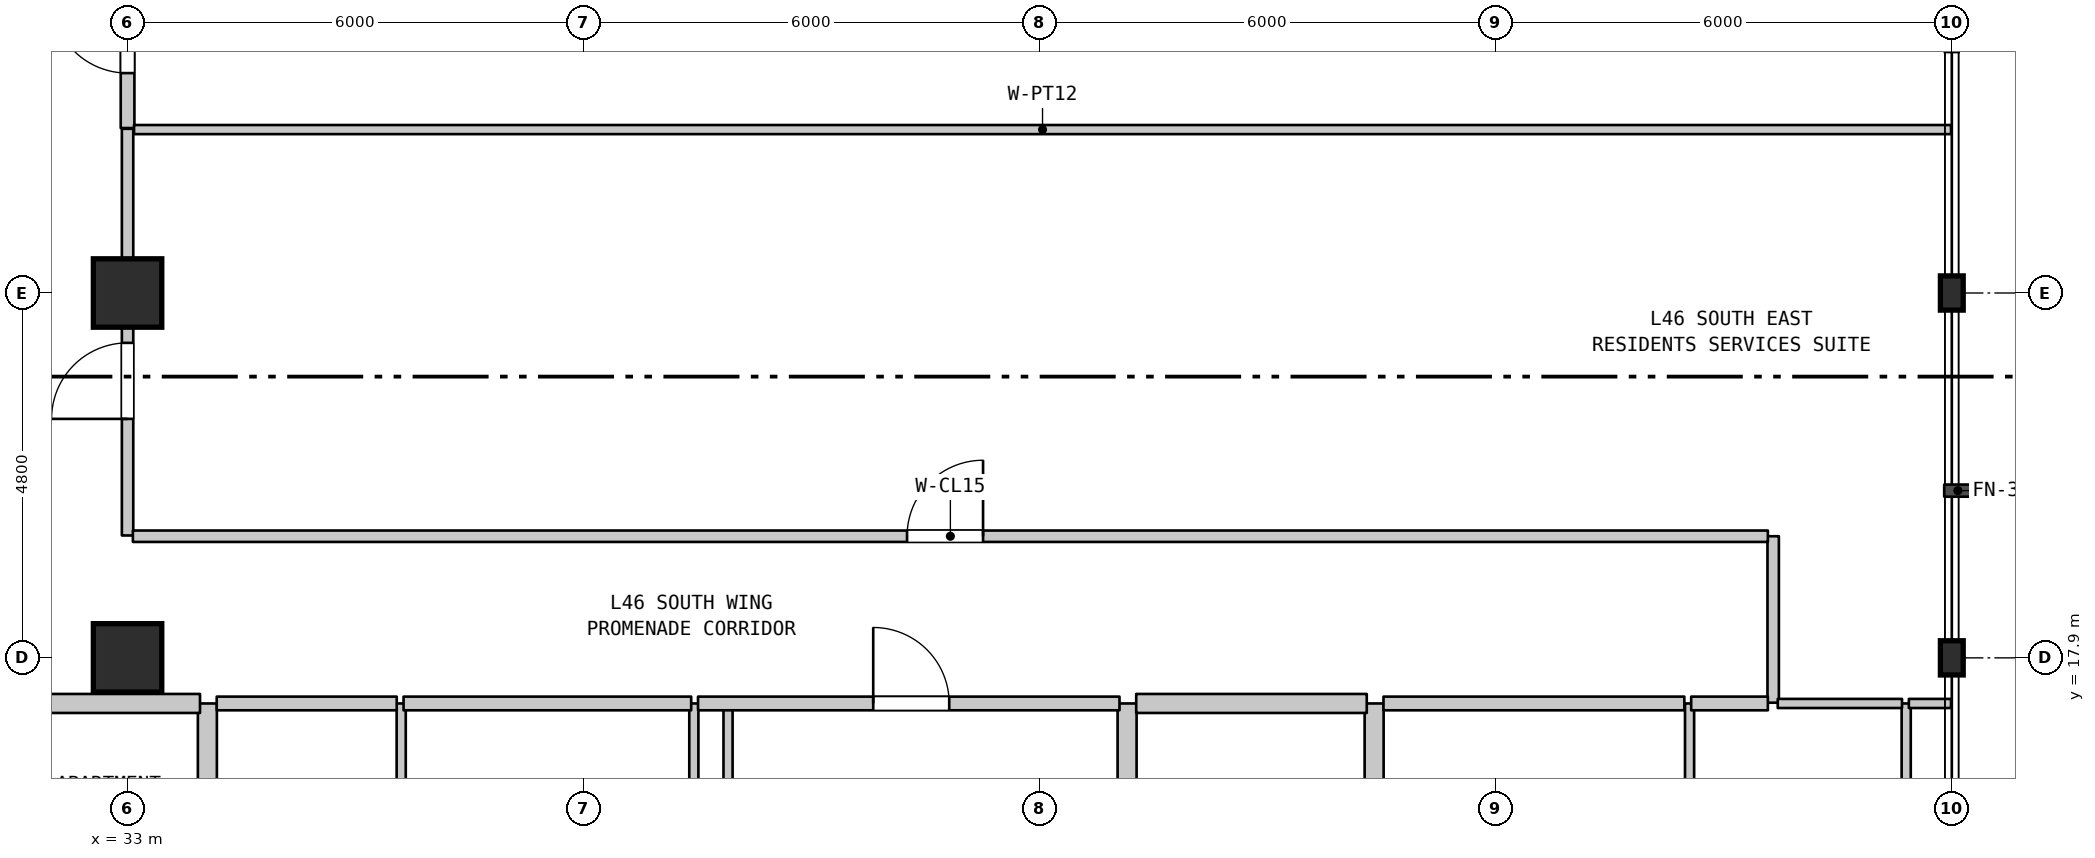
"""IFC4 building model, lengths in metres.
Left out: names, types, materials, properties, quantities, classifications, styles, units other than length and angle.
Written with IfcOpenShell. Run it as: python <this file> out.ifc"""

import sys

from ifc_helpers import new_model, si_unit, direction, frame, frame_2d, origin, origin_2d, place, context, subcontext, project, spatial, rectangle, i_section, extrude, element, fill, save


model = new_model("IFC4")
c1 = context("Model", 3, precision=1e-05, world=origin(), true_north=direction((0.0, 1.0)))
c2 = subcontext(c1, "Body", "Model", "MODEL_VIEW")
j1 = project(units=[si_unit("LENGTHUNIT", "METRE"), si_unit("PLANEANGLEUNIT", "RADIAN")], contexts=[c1])
p1 = place(None, origin())
s1 = spatial("IfcSite", under=j1, at=p1, CompositionType="ELEMENT")
p2 = place(p1, origin())
s2 = spatial("IfcBuilding", under=s1, at=p2, CompositionType="ELEMENT")
p3 = place(p2, frame((0.0, 0.0, 188.4)))
s3 = spatial("IfcBuildingStorey", under=s2, at=p3, CompositionType="ELEMENT", Elevation=188.4)
for number, where, z_axis, x_axis in (
    (1, (33.0, 17.9, 0.0), (0.0, 0.0, 1.0), (1.0, 0.0, 0.0)),
    (2, (33.0, 22.7, 0.0), (0.0, 0.0, 1.0), (1.0, 0.0, 0.0)),
):
    element("IfcColumn", number, at=place(p3, frame(where, z_axis=z_axis, x_axis=x_axis)), inside=s3, PredefinedType="COLUMN", context=c2, shape_type="SweptSolid", body=[
        extrude(rectangle(XDim=0.9, YDim=0.9, at=origin_2d()), origin(), (0.0, 0.0, 1.0), 3.7),
    ])
for number, where, z_axis, x_axis in (
    (3, (57.0, 17.9, 0.0), (0.0, 0.0, 1.0), (1.0, 0.0, 0.0)),
    (4, (57.0, 22.7, 0.0), (0.0, 0.0, 1.0), (1.0, 0.0, 0.0)),
):
    element("IfcColumn", number, at=place(p3, frame(where, z_axis=z_axis, x_axis=x_axis)), inside=s3, PredefinedType="COLUMN", context=c2, shape_type="SweptSolid", body=[
        extrude(i_section(OverallWidth=0.3, OverallDepth=0.45, WebThickness=0.014, FlangeThickness=0.026, FilletRadius=0.027, at=origin_2d()), origin(), (0.0, 0.0, 1.0), 3.7),
    ])
p4 = place(p3, frame((33.0, 19.51, 0.0), z_axis=(0.0, 0.0, 1.0), x_axis=(0.0, 1.0, 0.0)))
e5 = element("IfcWall", 5, at=p4, inside=s3, PredefinedType="STANDARD", context=c2, shape_type="SweptSolid", body=[
    extrude(rectangle(XDim=5.35, YDim=0.15, at=frame_2d((2.675, 0.0))), origin(), (0.0, 0.0, 1.0), 2.99),
])
p5 = place(p4, frame((1.534, 0.0, 0.0)))
e6 = element("IfcOpeningElement", 6, at=p5, cuts=e5, PredefinedType="OPENING", context=c2, shape_type="SweptSolid", body=[
    extrude(rectangle(XDim=1.0, YDim=2.15, at=frame_2d((0.5, 1.075))), frame((0.0, 0.085, 0.0), z_axis=(0.0, -1.0, 0.0), x_axis=(1.0, 0.0, 0.0)), (0.0, 0.0, 1.0), 0.17),
])
p6 = place(p3, frame((33.0, 24.87, 0.0), z_axis=(0.0, 0.0, 1.0), x_axis=(0.0, 1.0, 0.0)))
e7 = element("IfcWall", 7, at=p6, inside=s3, PredefinedType="STANDARD", context=c2, shape_type="SweptSolid", body=[
    extrude(rectangle(XDim=2.6, YDim=0.18, at=frame_2d((1.3, 0.0))), origin(), (0.0, 0.0, 1.0), 2.99),
])
p7 = place(p6, frame((0.723, 0.0, 0.0)))
e8 = element("IfcOpeningElement", 8, at=p7, cuts=e7, PredefinedType="OPENING", context=c2, shape_type="SweptSolid", body=[
    extrude(rectangle(XDim=1.0, YDim=2.15, at=frame_2d((0.5, 1.075))), frame((0.0, 0.1, 0.0), z_axis=(0.0, -1.0, 0.0), x_axis=(1.0, 0.0, 0.0)), (0.0, 0.0, 1.0), 0.2),
])
p8 = place(p3, frame((34.05, 11.15, 0.0), z_axis=(0.0, 0.0, 1.0), x_axis=(0.0, 1.0, 0.0)))
e9 = element("IfcWall", 9, at=p8, inside=s3, PredefinedType="STANDARD", context=c2, shape_type="SweptSolid", body=[
    extrude(rectangle(XDim=6.15, YDim=0.25, at=frame_2d((3.075, 0.0))), origin(), (0.0, 0.0, 1.0), 3.39),
])
for number, where, z_axis, x_axis in (
    (10, (36.6, 11.15, 0.0), (0.0, 0.0, 1.0), (0.0, 1.0, 0.0)),
    (11, (40.45, 11.15, 0.0), (0.0, 0.0, 1.0), (0.0, 1.0, 0.0)),
):
    element("IfcWall", number, at=place(p3, frame(where, z_axis=z_axis, x_axis=x_axis)), inside=s3, PredefinedType="PARTITIONING", context=c2, shape_type="SweptSolid", body=[
        extrude(rectangle(XDim=6.15, YDim=0.12, at=frame_2d((3.075, 0.0))), origin(), (0.0, 0.0, 1.0), 3.39),
    ])
p9 = place(p3, frame((40.9, 14.85, 0.0), z_axis=(0.0, 0.0, 1.0), x_axis=(0.0, 1.0, 0.0)))
e12 = element("IfcWall", 12, at=p9, inside=s3, PredefinedType="PARTITIONING", context=c2, shape_type="SweptSolid", body=[
    extrude(rectangle(XDim=2.45, YDim=0.12, at=frame_2d((1.225, 0.0))), origin(), (0.0, 0.0, 1.0), 3.39),
])
for number, where, z_axis, x_axis in (
    (13, (46.15, 11.15, 0.0), (0.0, 0.0, 1.0), (0.0, 1.0, 0.0)),
    (14, (49.4, 11.15, 0.0), (0.0, 0.0, 1.0), (0.0, 1.0, 0.0)),
):
    element("IfcWall", number, at=place(p3, frame(where, z_axis=z_axis, x_axis=x_axis)), inside=s3, PredefinedType="STANDARD", context=c2, shape_type="SweptSolid", body=[
        extrude(rectangle(XDim=6.15, YDim=0.25, at=frame_2d((3.075, 0.0))), origin(), (0.0, 0.0, 1.0), 3.39),
    ])
p10 = place(p3, frame((53.55, 11.15, 0.0), z_axis=(0.0, 0.0, 1.0), x_axis=(0.0, 1.0, 0.0)))
e15 = element("IfcWall", 15, at=p10, inside=s3, PredefinedType="PARTITIONING", context=c2, shape_type="SweptSolid", body=[
    extrude(rectangle(XDim=6.15, YDim=0.12, at=frame_2d((3.075, 0.0))), origin(), (0.0, 0.0, 1.0), 3.39),
])
p11 = place(p3, frame((54.65, 17.31, 0.0), z_axis=(0.0, 0.0, 1.0), x_axis=(0.0, 1.0, 0.0)))
e16 = element("IfcWall", 16, at=p11, inside=s3, PredefinedType="STANDARD", context=c2, shape_type="SweptSolid", body=[
    extrude(rectangle(XDim=2.19, YDim=0.15, at=frame_2d((1.095, 0.0))), origin(), (0.0, 0.0, 1.0), 3.39),
])
p12 = place(p3, frame((56.4, 11.15, 0.0), z_axis=(0.0, 0.0, 1.0), x_axis=(0.0, 1.0, 0.0)))
e17 = element("IfcWall", 17, at=p12, inside=s3, PredefinedType="PARTITIONING", context=c2, shape_type="SweptSolid", body=[
    extrude(rectangle(XDim=6.15, YDim=0.12, at=frame_2d((3.075, 0.0))), origin(), (0.0, 0.0, 1.0), 3.39),
])
p13 = place(p3, frame((31.56, 17.3, 0.0), z_axis=(0.0, 0.0, 1.0), x_axis=(1.0, 0.0, 0.0)))
e18 = element("IfcWall", 18, at=p13, inside=s3, PredefinedType="STANDARD", context=c2, shape_type="SweptSolid", body=[
    extrude(rectangle(XDim=2.393, YDim=0.25, at=frame_2d((1.196, 0.0))), origin(), (0.0, 0.0, 1.0), 3.39),
])
p14 = place(p3, frame((34.173, 17.3, 0.0), z_axis=(0.0, 0.0, 1.0), x_axis=(1.0, 0.0, 0.0)))
e19 = element("IfcWall", 19, at=p14, inside=s3, PredefinedType="STANDARD", context=c2, shape_type="SweptSolid", body=[
    extrude(rectangle(XDim=2.368, YDim=0.18, at=frame_2d((1.184, 0.0))), origin(), (0.0, 0.0, 1.0), 3.39),
])
p15 = place(p3, frame((36.631, 17.3, 0.0), z_axis=(0.0, 0.0, 1.0), x_axis=(1.0, 0.0, 0.0)))
e20 = element("IfcWall", 20, at=p15, inside=s3, PredefinedType="STANDARD", context=c2, shape_type="SweptSolid", body=[
    extrude(rectangle(XDim=3.784, YDim=0.18, at=frame_2d((1.892, 0.0))), origin(), (0.0, 0.0, 1.0), 3.39),
])
p16 = place(p3, frame((40.505, 17.3, 0.0), z_axis=(0.0, 0.0, 1.0), x_axis=(1.0, 0.0, 0.0)))
e21 = element("IfcWall", 21, at=p16, inside=s3, PredefinedType="STANDARD", context=c2, shape_type="SweptSolid", body=[
    extrude(rectangle(XDim=5.545, YDim=0.18, at=frame_2d((2.772, 0.0))), origin(), (0.0, 0.0, 1.0), 3.39),
])
p17 = place(p16, frame((2.305, 0.0, 0.0)))
e22 = element("IfcOpeningElement", 22, at=p17, cuts=e21, PredefinedType="OPENING", context=c2, shape_type="SweptSolid", body=[
    extrude(rectangle(XDim=1.0, YDim=2.15, at=frame_2d((0.5, 1.075))), frame((0.0, 0.1, 0.0), z_axis=(0.0, -1.0, 0.0), x_axis=(1.0, 0.0, 0.0)), (0.0, 0.0, 1.0), 0.2),
])
p18 = place(p3, frame((46.27, 17.3, 0.0), z_axis=(0.0, 0.0, 1.0), x_axis=(1.0, 0.0, 0.0)))
e23 = element("IfcWall", 23, at=p18, inside=s3, PredefinedType="STANDARD", context=c2, shape_type="SweptSolid", body=[
    extrude(rectangle(XDim=3.033, YDim=0.25, at=frame_2d((1.517, 0.0))), origin(), (0.0, 0.0, 1.0), 3.39),
])
p19 = place(p3, frame((49.523, 17.3, 0.0), z_axis=(0.0, 0.0, 1.0), x_axis=(1.0, 0.0, 0.0)))
e24 = element("IfcWall", 24, at=p19, inside=s3, PredefinedType="STANDARD", context=c2, shape_type="SweptSolid", body=[
    extrude(rectangle(XDim=3.958, YDim=0.18, at=frame_2d((1.979, 0.0))), origin(), (0.0, 0.0, 1.0), 3.39),
])
p20 = place(p3, frame((53.571, 17.3, 0.0), z_axis=(0.0, 0.0, 1.0), x_axis=(1.0, 0.0, 0.0)))
e25 = element("IfcWall", 25, at=p20, inside=s3, PredefinedType="STANDARD", context=c2, shape_type="SweptSolid", body=[
    extrude(rectangle(XDim=1.009, YDim=0.18, at=frame_2d((0.504, 0.0))), origin(), (0.0, 0.0, 1.0), 3.39),
])
p21 = place(p3, frame((54.71, 17.3, 0.0), z_axis=(0.0, 0.0, 1.0), x_axis=(1.0, 0.0, 0.0)))
e26 = element("IfcWall", 26, at=p21, inside=s3, PredefinedType="PARTITIONING", context=c2, shape_type="SweptSolid", body=[
    extrude(rectangle(XDim=1.635, YDim=0.12, at=frame_2d((0.817, 0.0))), origin(), (0.0, 0.0, 1.0), 3.39),
])
p22 = place(p3, frame((56.435, 17.3, 0.0), z_axis=(0.0, 0.0, 1.0), x_axis=(1.0, 0.0, 0.0)))
e27 = element("IfcWall", 27, at=p22, inside=s3, PredefinedType="PARTITIONING", context=c2, shape_type="SweptSolid", body=[
    extrude(rectangle(XDim=0.555, YDim=0.12, at=frame_2d((0.277, 0.0))), origin(), (0.0, 0.0, 1.0), 3.39),
])
p23 = place(p3, frame((33.07, 19.5, 0.0), z_axis=(0.0, 0.0, 1.0), x_axis=(1.0, 0.0, 0.0)))
e28 = element("IfcWall", 28, at=p23, inside=s3, PredefinedType="STANDARD", context=c2, shape_type="SweptSolid", body=[
    extrude(rectangle(XDim=21.51, YDim=0.15, at=frame_2d((10.755, 0.0))), origin(), (0.0, 0.0, 1.0), 3.39),
])
p24 = place(p23, frame((10.185, 0.0, 0.0)))
e29 = element("IfcOpeningElement", 29, at=p24, cuts=e28, PredefinedType="OPENING", context=c2, shape_type="SweptSolid", body=[
    extrude(rectangle(XDim=1.0, YDim=2.15, at=frame_2d((0.5, 1.075))), frame((0.0, 0.085, 0.0), z_axis=(0.0, -1.0, 0.0), x_axis=(1.0, 0.0, 0.0)), (0.0, 0.0, 1.0), 0.17),
])
p25 = place(p3, frame((33.085, 24.85, 0.0), z_axis=(0.0, 0.0, 1.0), x_axis=(1.0, 0.0, 0.0)))
e30 = element("IfcWall", 30, at=p25, inside=s3, PredefinedType="PARTITIONING", context=c2, shape_type="SweptSolid", body=[
    extrude(rectangle(XDim=23.905, YDim=0.12, at=frame_2d((11.953, 0.0))), origin(), (0.0, 0.0, 1.0), 3.39),
])
p26 = place(p5, origin())
e31 = element("IfcDoor", 31, at=p26, inside=s3, OperationType="SINGLE_SWING_LEFT", PredefinedType="DOOR", context=c2, shape_type="SweptSolid", body=[
    extrude(rectangle(XDim=1.0, YDim=2.15, at=frame_2d((0.5, 1.075))), frame((0.0, 0.025, 0.0), z_axis=(0.0, -1.0, 0.0), x_axis=(1.0, 0.0, 0.0)), (0.0, 0.0, 1.0), 0.05),
])
fill(e6, e31)
p27 = place(p7, origin())
e32 = element("IfcDoor", 32, at=p27, inside=s3, OperationType="SINGLE_SWING_RIGHT", PredefinedType="DOOR", context=c2, shape_type="SweptSolid", body=[
    extrude(rectangle(XDim=1.0, YDim=2.15, at=frame_2d((0.5, 1.075))), frame((0.0, 0.025, 0.0), z_axis=(0.0, -1.0, 0.0), x_axis=(1.0, 0.0, 0.0)), (0.0, 0.0, 1.0), 0.05),
])
fill(e8, e32)
p28 = place(p17, origin())
e33 = element("IfcDoor", 33, at=p28, inside=s3, OperationType="SINGLE_SWING_LEFT", PredefinedType="DOOR", context=c2, shape_type="SweptSolid", body=[
    extrude(rectangle(XDim=1.0, YDim=2.15, at=frame_2d((0.5, 1.075))), frame((0.0, 0.025, 0.0), z_axis=(0.0, -1.0, 0.0), x_axis=(1.0, 0.0, 0.0)), (0.0, 0.0, 1.0), 0.05),
])
fill(e22, e33)
p29 = place(p24, origin())
e34 = element("IfcDoor", 34, at=p29, inside=s3, OperationType="SINGLE_SWING_RIGHT", PredefinedType="DOOR", context=c2, shape_type="SweptSolid", body=[
    extrude(rectangle(XDim=1.0, YDim=2.15, at=frame_2d((0.5, 1.075))), frame((0.0, 0.025, 0.0), z_axis=(0.0, -1.0, 0.0), x_axis=(1.0, 0.0, 0.0)), (0.0, 0.0, 1.0), 0.05),
])
fill(e29, e34)
save(model, sys.argv[1])
